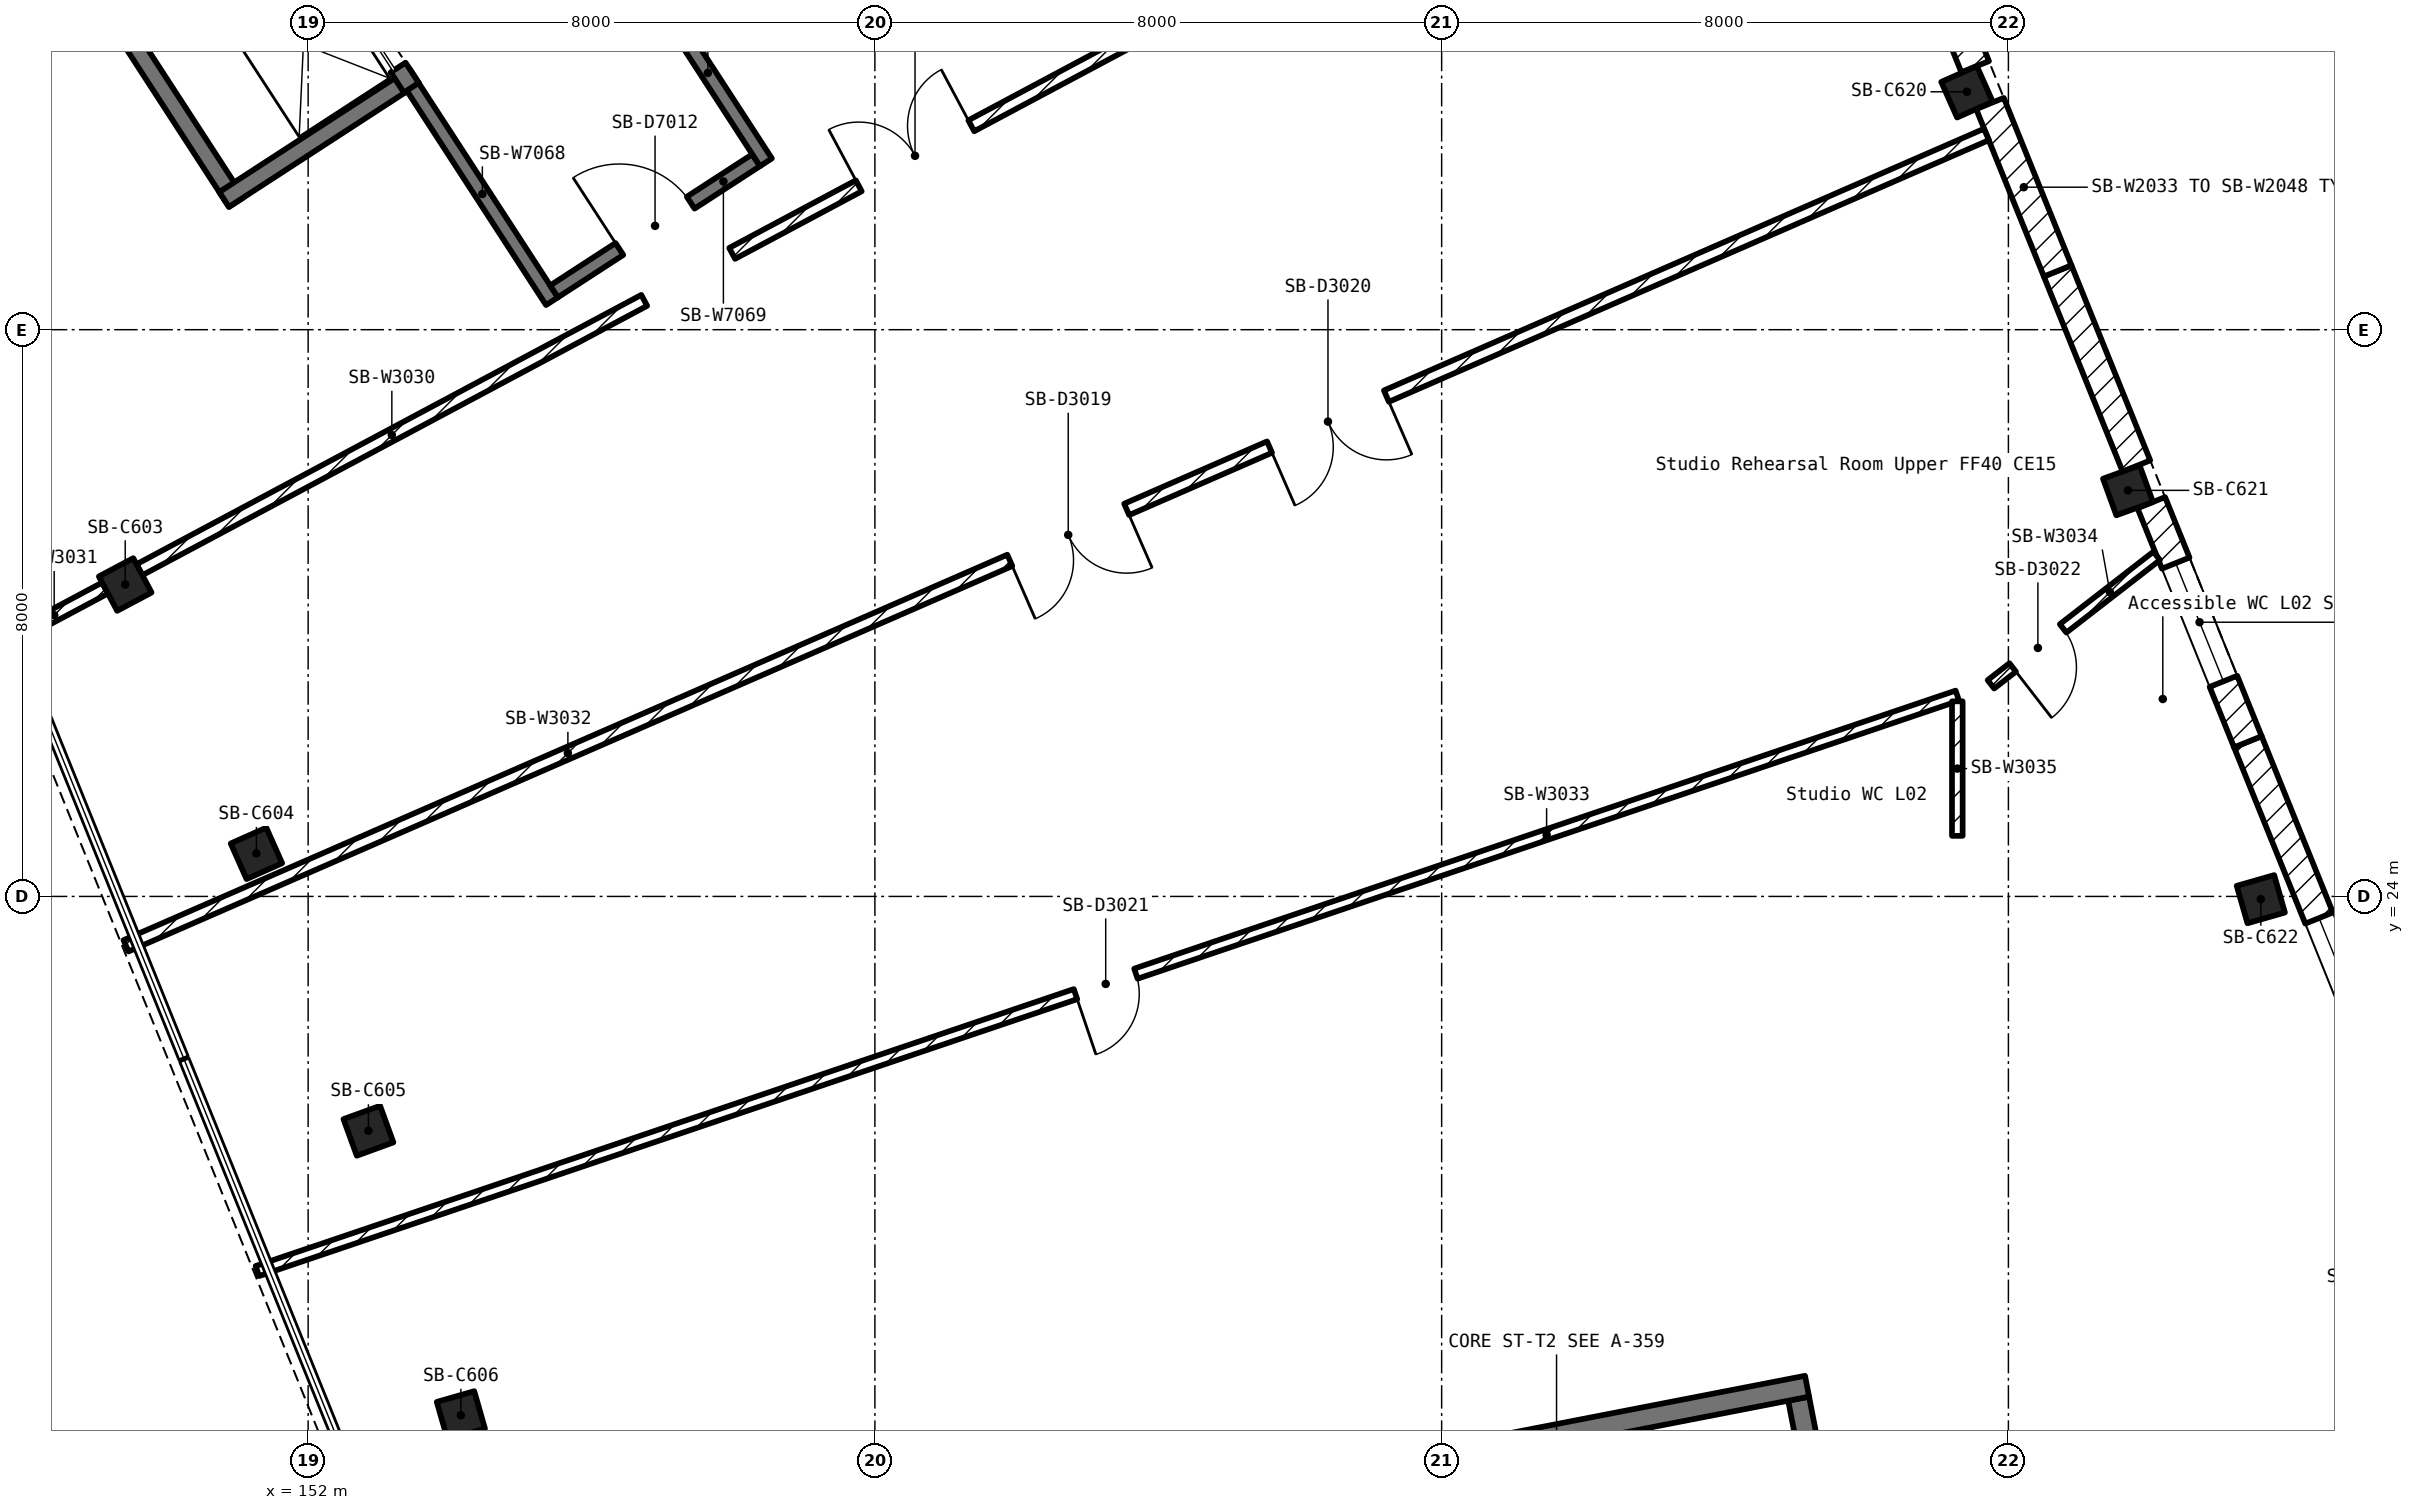
"""IFC4 building model, lengths in metres.
Left out: names, types, materials, properties, quantities, classifications, styles, units other than length and angle.
Written with IfcOpenShell. Run it as: python <this file> out.ifc"""

import sys

from ifc_helpers import new_model, si_unit, direction, frame, frame_2d, origin, origin_2d, place, context, subcontext, project, spatial, rectangle, extrude, element, fill, save


model = new_model("IFC4")
c1 = context("Model", 3, precision=1e-05, world=origin(), true_north=direction((0.0, 1.0)))
c2 = subcontext(c1, "Body", "Model", "MODEL_VIEW")
j1 = project(units=[si_unit("LENGTHUNIT", "METRE"), si_unit("PLANEANGLEUNIT", "RADIAN")], contexts=[c1])
p1 = place(None, origin())
s1 = spatial("IfcSite", under=j1, at=p1, CompositionType="ELEMENT")
p2 = place(p1, origin())
s2 = spatial("IfcBuilding", under=s1, at=p2, CompositionType="ELEMENT")
p3 = place(p2, frame((0.0, 0.0, 11.5)))
s3 = spatial("IfcBuildingStorey", under=s2, at=p3, CompositionType="ELEMENT", Elevation=11.5)
for number, where, z_axis, x_axis in (
    (1, (149.418, 28.403, 0.0), (0.0, 0.0, 1.0), (0.469, -0.883, 0.0)),
    (2, (151.27, 24.608, 0.0), (0.0, 0.0, 1.0), (0.407, -0.914, 0.0)),
    (3, (152.851, 20.692, 0.0), (0.0, 0.0, 1.0), (0.342, -0.94, 0.0)),
    (4, (154.156, 16.676, 0.0), (0.0, 0.0, 1.0), (0.276, -0.961, 0.0)),
    (5, (175.415, 35.358, 0.0), (0.0, 0.0, 1.0), (0.407, -0.914, 0.0)),
    (6, (177.688, 29.732, 0.0), (0.0, 0.0, 1.0), (0.342, -0.94, 0.0)),
    (7, (179.563, 23.961, 0.0), (0.0, 0.0, 1.0), (0.276, -0.961, 0.0)),
):
    element("IfcColumn", number, at=place(p3, frame(where, z_axis=z_axis, x_axis=x_axis)), inside=s3, PredefinedType="COLUMN", context=c2, shape_type="SweptSolid", body=[
        extrude(rectangle(XDim=0.55, YDim=0.55, at=origin_2d()), origin(), (0.0, 0.0, 1.0), 5.5),
    ])
p4 = place(p3, frame((182.065, 19.537, 0.0), z_axis=(0.0, 0.0, 1.0), x_axis=(-0.374594824941, 0.927188609252, 0.0)))
e8 = element("IfcWall", 8, at=p4, inside=s3, PredefinedType="SOLIDWALL", context=c2, shape_type="SweptSolid", body=[
    extrude(rectangle(XDim=7.168, YDim=0.42, at=frame_2d((3.584, 0.0))), origin(), (0.0, 0.0, 1.0), 5.2),
])
p5 = place(p4, frame((2.684, 0.0, 1.0)))
e9 = element("IfcOpeningElement", 9, at=p5, cuts=e8, PredefinedType="OPENING", context=c2, shape_type="SweptSolid", body=[
    extrude(rectangle(XDim=1.8, YDim=1.5, at=frame_2d((0.9, 0.75))), frame((0.0, 0.222, 0.0), z_axis=(0.0, -1.0, 0.0), x_axis=(1.0, 0.0, 0.0)), (0.0, 0.0, 1.0), 0.444),
])
p6 = place(p3, frame((179.38, 26.183, 0.0), z_axis=(0.0, 0.0, 1.0), x_axis=(-0.374418687249, 0.927259751439, 0.0)))
e10 = element("IfcWall", 10, at=p6, inside=s3, PredefinedType="SOLIDWALL", context=c2, shape_type="SweptSolid", body=[
    extrude(rectangle(XDim=3.64, YDim=0.42, at=frame_2d((1.82, 0.0))), origin(), (0.0, 0.0, 1.0), 4.5),
])
p7 = place(p6, frame((0.92, 0.0, 1.0)))
e11 = element("IfcOpeningElement", 11, at=p7, cuts=e10, PredefinedType="OPENING", context=c2, shape_type="SweptSolid", body=[
    extrude(rectangle(XDim=1.8, YDim=1.5, at=frame_2d((0.9, 0.75))), frame((0.0, 0.222, 0.0), z_axis=(0.0, -1.0, 0.0), x_axis=(1.0, 0.0, 0.0)), (0.0, 0.0, 1.0), 0.444),
])
p8 = place(p3, frame((177.807, 30.076, 0.0), z_axis=(0.0, 0.0, 1.0), x_axis=(-0.374336649646, 0.927292873224, 0.0)))
e12 = element("IfcWall", 12, at=p8, inside=s3, PredefinedType="SOLIDWALL", context=c2, shape_type="SweptSolid", body=[
    extrude(rectangle(XDim=2.97, YDim=0.42, at=frame_2d((1.485, 0.0))), origin(), (0.0, 0.0, 1.0), 4.5),
])
p9 = place(p3, frame((176.695, 32.83, 0.0), z_axis=(0.0, 0.0, 1.0), x_axis=(-0.374724358983, 0.927136265489, 0.0)))
e13 = element("IfcWall", 13, at=p9, inside=s3, PredefinedType="SOLIDWALL", context=c2, shape_type="SweptSolid", body=[
    extrude(rectangle(XDim=2.549, YDim=0.42, at=frame_2d((1.274, 0.0))), origin(), (0.0, 0.0, 1.0), 4.5),
])
p10 = place(p3, frame((175.531, 35.712, 0.0), z_axis=(0.0, 0.0, 1.0), x_axis=(-0.374644003401, 0.927168739074, 0.0)))
e14 = element("IfcWall", 14, at=p10, inside=s3, PredefinedType="SOLIDWALL", context=c2, shape_type="SweptSolid", body=[
    extrude(rectangle(XDim=4.06, YDim=0.42, at=frame_2d((2.03, 0.0))), origin(), (0.0, 0.0, 1.0), 4.5),
])
p11 = place(p10, frame((1.13, 0.0, 1.0)))
e15 = element("IfcOpeningElement", 15, at=p11, cuts=e14, PredefinedType="OPENING", context=c2, shape_type="SweptSolid", body=[
    extrude(rectangle(XDim=1.8, YDim=1.5, at=frame_2d((0.9, 0.75))), frame((0.0, 0.222, 0.0), z_axis=(0.0, -1.0, 0.0), x_axis=(1.0, 0.0, 0.0)), (0.0, 0.0, 1.0), 0.444),
])
p12 = place(p3, frame((173.764, 13.18, 0.0), z_axis=(0.0, 0.0, 1.0), x_axis=(-0.190763033741, 0.981636116368, 0.0)))
e16 = element("IfcWall", 16, at=p12, inside=s3, PredefinedType="SOLIDWALL", context=c2, shape_type="SweptSolid", body=[
    extrude(rectangle(XDim=3.8, YDim=0.3, at=frame_2d((1.9, 0.0))), origin(), (0.0, 0.0, 1.0), 5.5),
])
p13 = place(p3, frame((173.158, 17.086, 0.0), z_axis=(0.0, 0.0, 1.0), x_axis=(-0.981641111144, -0.190737329623, 0.0)))
e17 = element("IfcWall", 17, at=p13, inside=s3, PredefinedType="SOLIDWALL", context=c2, shape_type="SweptSolid", body=[
    extrude(rectangle(XDim=8.0, YDim=0.3, at=frame_2d((4.0, 0.0))), origin(), (0.0, 0.0, 1.0), 5.5),
])
for number, where, z_axis, x_axis in (
    (18, (149.244, 36.485, 0.0), (0.0, 0.0, 1.0), (0.545, -0.839, 0.0)),
    (19, (150.814, 33.838, 0.0), (0.0, 0.0, 1.0), (0.839, 0.545, 0.0)),
):
    element("IfcWall", number, at=place(p3, frame(where, z_axis=z_axis, x_axis=x_axis)), inside=s3, PredefinedType="SOLIDWALL", context=c2, shape_type="SweptSolid", body=[
        extrude(rectangle(XDim=3.2, YDim=0.25, at=frame_2d((1.6, 0.0))), origin(), (0.0, 0.0, 1.0), 5.5),
    ])
p14 = place(p3, frame((153.461, 35.408, 0.0), z_axis=(0.0, 0.0, 1.0), x_axis=(-0.544746938909, 0.838600484467, 0.0)))
e20 = element("IfcWall", 20, at=p14, inside=s3, PredefinedType="SOLIDWALL", context=c2, shape_type="SweptSolid", body=[
    extrude(rectangle(XDim=3.199, YDim=0.25, at=frame_2d((1.6, 0.0))), origin(), (0.0, 0.0, 1.0), 5.5),
])
p15 = place(p14, frame((0.35, 0.0, 0.0)))
e21 = element("IfcOpeningElement", 21, at=p15, cuts=e20, PredefinedType="OPENING", context=c2, shape_type="SweptSolid", body=[
    extrude(rectangle(XDim=2.0, YDim=2.2, at=frame_2d((1.0, 1.1))), frame((0.0, 0.137, 0.0), z_axis=(0.0, -1.0, 0.0), x_axis=(1.0, 0.0, 0.0)), (0.0, 0.0, 1.0), 0.274),
])
p16 = place(p3, frame((153.476, 35.429, 0.0), z_axis=(0.0, 0.0, 1.0), x_axis=(0.544669706692, -0.838650648728, 0.0)))
e22 = element("IfcWall", 22, at=p16, inside=s3, PredefinedType="PARTITIONING", context=c2, shape_type="SweptSolid", body=[
    extrude(rectangle(XDim=3.609, YDim=0.2, at=frame_2d((1.805, 0.0))), origin(), (0.0, 0.0, 1.0), 5.28),
])
p17 = place(p3, frame((155.471, 32.54, 0.0), z_axis=(0.0, 0.0, 1.0), x_axis=(0.838683012783, 0.544619871167, 0.0)))
e23 = element("IfcWall", 23, at=p17, inside=s3, PredefinedType="PARTITIONING", context=c2, shape_type="SweptSolid", body=[
    extrude(rectangle(XDim=3.401, YDim=0.2, at=frame_2d((1.7, 0.0))), origin(), (0.0, 0.0, 1.0), 5.28),
])
p18 = place(p17, frame((1.1, 0.0, 0.0)))
e24 = element("IfcOpeningElement", 24, at=p18, cuts=e23, PredefinedType="OPENING", context=c2, shape_type="SweptSolid", body=[
    extrude(rectangle(XDim=1.2, YDim=2.1, at=frame_2d((0.6, 1.05))), frame((0.0, 0.112, 0.0), z_axis=(0.0, -1.0, 0.0), x_axis=(1.0, 0.0, 0.0)), (0.0, 0.0, 1.0), 0.224),
])
p19 = place(p3, frame((158.462, 34.363, 0.0), z_axis=(0.0, 0.0, 1.0), x_axis=(-0.544606183959, 0.838691900756, 0.0)))
e25 = element("IfcWall", 25, at=p19, inside=s3, PredefinedType="PARTITIONING", context=c2, shape_type="SweptSolid", body=[
    extrude(rectangle(XDim=3.009, YDim=0.2, at=frame_2d((1.505, 0.0))), origin(), (0.0, 0.0, 1.0), 5.28),
])
p20 = place(p3, frame((157.985, 33.077, 0.0), z_axis=(0.0, 0.0, 1.0), x_axis=(0.882245671987, 0.470789309841, 0.0)))
e26 = element("IfcWall", 26, at=p20, inside=s3, PredefinedType="PARTITIONING", context=c2, shape_type="SweptSolid", body=[
    extrude(rectangle(XDim=16.825, YDim=0.175, at=frame_2d((8.413, 0.0))), origin(), (0.0, 0.0, 1.0), 4.3),
])
p21 = place(p20, frame((2.026, 0.0, 0.0)))
e27 = element("IfcOpeningElement", 27, at=p21, cuts=e26, PredefinedType="OPENING", context=c2, shape_type="SweptSolid", body=[
    extrude(rectangle(XDim=1.8, YDim=2.1, at=frame_2d((0.9, 1.05))), frame((0.0, 0.1, 0.0), z_axis=(0.0, -1.0, 0.0), x_axis=(1.0, 0.0, 0.0)), (0.0, 0.0, 1.0), 0.199),
])
p22 = place(p20, frame((6.276, 0.0, 0.0)))
e28 = element("IfcOpeningElement", 28, at=p22, cuts=e26, PredefinedType="OPENING", context=c2, shape_type="SweptSolid", body=[
    extrude(rectangle(XDim=1.8, YDim=2.1, at=frame_2d((0.9, 1.05))), frame((0.0, 0.1, 0.0), z_axis=(0.0, -1.0, 0.0), x_axis=(1.0, 0.0, 0.0)), (0.0, 0.0, 1.0), 0.199),
])
p23 = place(p3, frame((149.619, 28.612, 0.0), z_axis=(0.0, 0.0, 1.0), x_axis=(0.882249989565, 0.470781218733, 0.0)))
e29 = element("IfcWall", 29, at=p23, inside=s3, PredefinedType="PARTITIONING", context=c2, shape_type="SweptSolid", body=[
    extrude(rectangle(XDim=8.076, YDim=0.175, at=frame_2d((4.038, 0.0))), origin(), (0.0, 0.0, 1.0), 4.3),
])
p24 = place(p3, frame((147.698, 27.587, 0.0), z_axis=(0.0, 0.0, 1.0), x_axis=(0.882161764928, 0.47094651554, 0.0)))
e30 = element("IfcWall", 30, at=p24, inside=s3, PredefinedType="PARTITIONING", context=c2, shape_type="SweptSolid", body=[
    extrude(rectangle(XDim=1.627, YDim=0.175, at=frame_2d((0.813, 0.0))), origin(), (0.0, 0.0, 1.0), 4.3),
])
p25 = place(p3, frame((175.69, 34.756, 0.0), z_axis=(0.0, 0.0, 1.0), x_axis=(-0.916618872493, -0.39976223257, 0.0)))
e31 = element("IfcWall", 31, at=p25, inside=s3, PredefinedType="PARTITIONING", context=c2, shape_type="SweptSolid", body=[
    extrude(rectangle(XDim=28.65, YDim=0.175, at=frame_2d((14.325, 0.0))), origin(), (0.0, 0.0, 1.0), 4.3),
])
p26 = place(p25, frame((13.24, 0.0, 0.0)))
e32 = element("IfcOpeningElement", 32, at=p26, cuts=e31, PredefinedType="OPENING", context=c2, shape_type="SweptSolid", body=[
    extrude(rectangle(XDim=1.8, YDim=2.1, at=frame_2d((0.9, 1.05))), frame((0.0, 0.1, 0.0), z_axis=(0.0, -1.0, 0.0), x_axis=(1.0, 0.0, 0.0)), (0.0, 0.0, 1.0), 0.199),
])
p27 = place(p25, frame((9.24, 0.0, 0.0)))
e33 = element("IfcOpeningElement", 33, at=p27, cuts=e31, PredefinedType="OPENING", context=c2, shape_type="SweptSolid", body=[
    extrude(rectangle(XDim=1.8, YDim=2.1, at=frame_2d((0.9, 1.05))), frame((0.0, 0.1, 0.0), z_axis=(0.0, -1.0, 0.0), x_axis=(1.0, 0.0, 0.0)), (0.0, 0.0, 1.0), 0.199),
])
p28 = place(p3, frame((175.279, 26.834, 0.0), z_axis=(0.0, 0.0, 1.0), x_axis=(-0.947212187519, -0.320607348348, 0.0)))
e34 = element("IfcWall", 34, at=p28, inside=s3, PredefinedType="PARTITIONING", context=c2, shape_type="SweptSolid", body=[
    extrude(rectangle(XDim=25.333, YDim=0.15, at=frame_2d((12.667, 0.0))), origin(), (0.0, 0.0, 1.0), 4.3),
])
p29 = place(p28, frame((12.241, 0.0, 0.0)))
e35 = element("IfcOpeningElement", 35, at=p29, cuts=e34, PredefinedType="OPENING", context=c2, shape_type="SweptSolid", body=[
    extrude(rectangle(XDim=0.9, YDim=2.1, at=frame_2d((0.45, 1.05))), frame((0.0, 0.087, 0.0), z_axis=(0.0, -1.0, 0.0), x_axis=(1.0, 0.0, 0.0)), (0.0, 0.0, 1.0), 0.174),
])
p30 = place(p3, frame((178.093, 28.807, 0.0), z_axis=(0.0, 0.0, 1.0), x_axis=(-0.790509882563, -0.61244928408, 0.0)))
e36 = element("IfcWall", 36, at=p30, inside=s3, PredefinedType="PARTITIONING", context=c2, shape_type="SweptSolid", body=[
    extrude(rectangle(XDim=2.96, YDim=0.15, at=frame_2d((1.48, 0.0))), origin(), (0.0, 0.0, 1.0), 4.3),
])
p31 = place(p30, frame((1.671, 0.0, 0.0)))
e37 = element("IfcOpeningElement", 37, at=p31, cuts=e36, PredefinedType="OPENING", context=c2, shape_type="SweptSolid", body=[
    extrude(rectangle(XDim=0.9, YDim=2.1, at=frame_2d((0.45, 1.05))), frame((0.0, 0.087, 0.0), z_axis=(0.0, -1.0, 0.0), x_axis=(1.0, 0.0, 0.0)), (0.0, 0.0, 1.0), 0.174),
])
p32 = place(p3, frame((175.279, 24.855, 0.0), z_axis=(0.0, 0.0, 1.0), x_axis=(0.0, 1.0, 0.0)))
e38 = element("IfcWall", 38, at=p32, inside=s3, PredefinedType="PARTITIONING", context=c2, shape_type="SweptSolid", body=[
    extrude(rectangle(XDim=1.899, YDim=0.15, at=frame_2d((0.949, 0.0))), origin(), (0.0, 0.0, 1.0), 4.3),
])
p33 = place(p5, origin())
e39 = element("IfcWindow", 39, at=p33, inside=s3, PartitioningType="DOUBLE_PANEL_VERTICAL", PredefinedType="WINDOW", context=c2, shape_type="SweptSolid", body=[
    extrude(rectangle(XDim=1.8, YDim=1.5, at=frame_2d((0.9, 0.75))), frame((0.0, 0.03, 0.0), z_axis=(0.0, -1.0, 0.0), x_axis=(1.0, 0.0, 0.0)), (0.0, 0.0, 1.0), 0.06),
])
fill(e9, e39)
p34 = place(p7, origin())
e40 = element("IfcWindow", 40, at=p34, inside=s3, PartitioningType="DOUBLE_PANEL_VERTICAL", PredefinedType="WINDOW", context=c2, shape_type="SweptSolid", body=[
    extrude(rectangle(XDim=1.8, YDim=1.5, at=frame_2d((0.9, 0.75))), frame((0.0, 0.03, 0.0), z_axis=(0.0, -1.0, 0.0), x_axis=(1.0, 0.0, 0.0)), (0.0, 0.0, 1.0), 0.06),
])
fill(e11, e40)
p35 = place(p15, origin())
e41 = element("IfcDoor", 41, at=p35, inside=s3, OperationType="DOUBLE_DOOR_SLIDING", PredefinedType="DOOR", context=c2, shape_type="SweptSolid", body=[
    extrude(rectangle(XDim=2.0, YDim=2.2, at=frame_2d((1.0, 1.1))), frame((0.0, 0.025, 0.0), z_axis=(0.0, -1.0, 0.0), x_axis=(1.0, 0.0, 0.0)), (0.0, 0.0, 1.0), 0.05),
])
fill(e21, e41)
p36 = place(p18, origin())
e42 = element("IfcDoor", 42, at=p36, inside=s3, OperationType="SINGLE_SWING_LEFT", PredefinedType="DOOR", context=c2, shape_type="SweptSolid", body=[
    extrude(rectangle(XDim=1.2, YDim=2.1, at=frame_2d((0.6, 1.05))), frame((0.0, 0.025, 0.0), z_axis=(0.0, -1.0, 0.0), x_axis=(1.0, 0.0, 0.0)), (0.0, 0.0, 1.0), 0.05),
])
fill(e24, e42)
p37 = place(p21, origin())
e43 = element("IfcDoor", 43, at=p37, inside=s3, OperationType="DOUBLE_DOOR_SINGLE_SWING", PredefinedType="DOOR", context=c2, shape_type="SweptSolid", body=[
    extrude(rectangle(XDim=1.8, YDim=2.1, at=frame_2d((0.9, 1.05))), frame((0.0, 0.025, 0.0), z_axis=(0.0, -1.0, 0.0), x_axis=(1.0, 0.0, 0.0)), (0.0, 0.0, 1.0), 0.05),
])
fill(e27, e43)
p38 = place(p26, origin())
e44 = element("IfcDoor", 44, at=p38, inside=s3, OperationType="DOUBLE_DOOR_SINGLE_SWING", PredefinedType="DOOR", context=c2, shape_type="SweptSolid", body=[
    extrude(rectangle(XDim=1.8, YDim=2.1, at=frame_2d((0.9, 1.05))), frame((0.0, 0.025, 0.0), z_axis=(0.0, -1.0, 0.0), x_axis=(1.0, 0.0, 0.0)), (0.0, 0.0, 1.0), 0.05),
])
fill(e32, e44)
p39 = place(p27, origin())
e45 = element("IfcDoor", 45, at=p39, inside=s3, OperationType="DOUBLE_DOOR_SINGLE_SWING", PredefinedType="DOOR", context=c2, shape_type="SweptSolid", body=[
    extrude(rectangle(XDim=1.8, YDim=2.1, at=frame_2d((0.9, 1.05))), frame((0.0, 0.025, 0.0), z_axis=(0.0, -1.0, 0.0), x_axis=(1.0, 0.0, 0.0)), (0.0, 0.0, 1.0), 0.05),
])
fill(e33, e45)
p40 = place(p29, origin())
e46 = element("IfcDoor", 46, at=p40, inside=s3, OperationType="SINGLE_SWING_RIGHT", PredefinedType="DOOR", context=c2, shape_type="SweptSolid", body=[
    extrude(rectangle(XDim=0.9, YDim=2.1, at=frame_2d((0.45, 1.05))), frame((0.0, 0.025, 0.0), z_axis=(0.0, -1.0, 0.0), x_axis=(1.0, 0.0, 0.0)), (0.0, 0.0, 1.0), 0.05),
])
fill(e35, e46)
p41 = place(p31, origin())
e47 = element("IfcDoor", 47, at=p41, inside=s3, OperationType="SINGLE_SWING_RIGHT", PredefinedType="DOOR", context=c2, shape_type="SweptSolid", body=[
    extrude(rectangle(XDim=0.9, YDim=2.1, at=frame_2d((0.45, 1.05))), frame((0.0, 0.025, 0.0), z_axis=(0.0, -1.0, 0.0), x_axis=(1.0, 0.0, 0.0)), (0.0, 0.0, 1.0), 0.05),
])
fill(e37, e47)
save(model, sys.argv[1])
